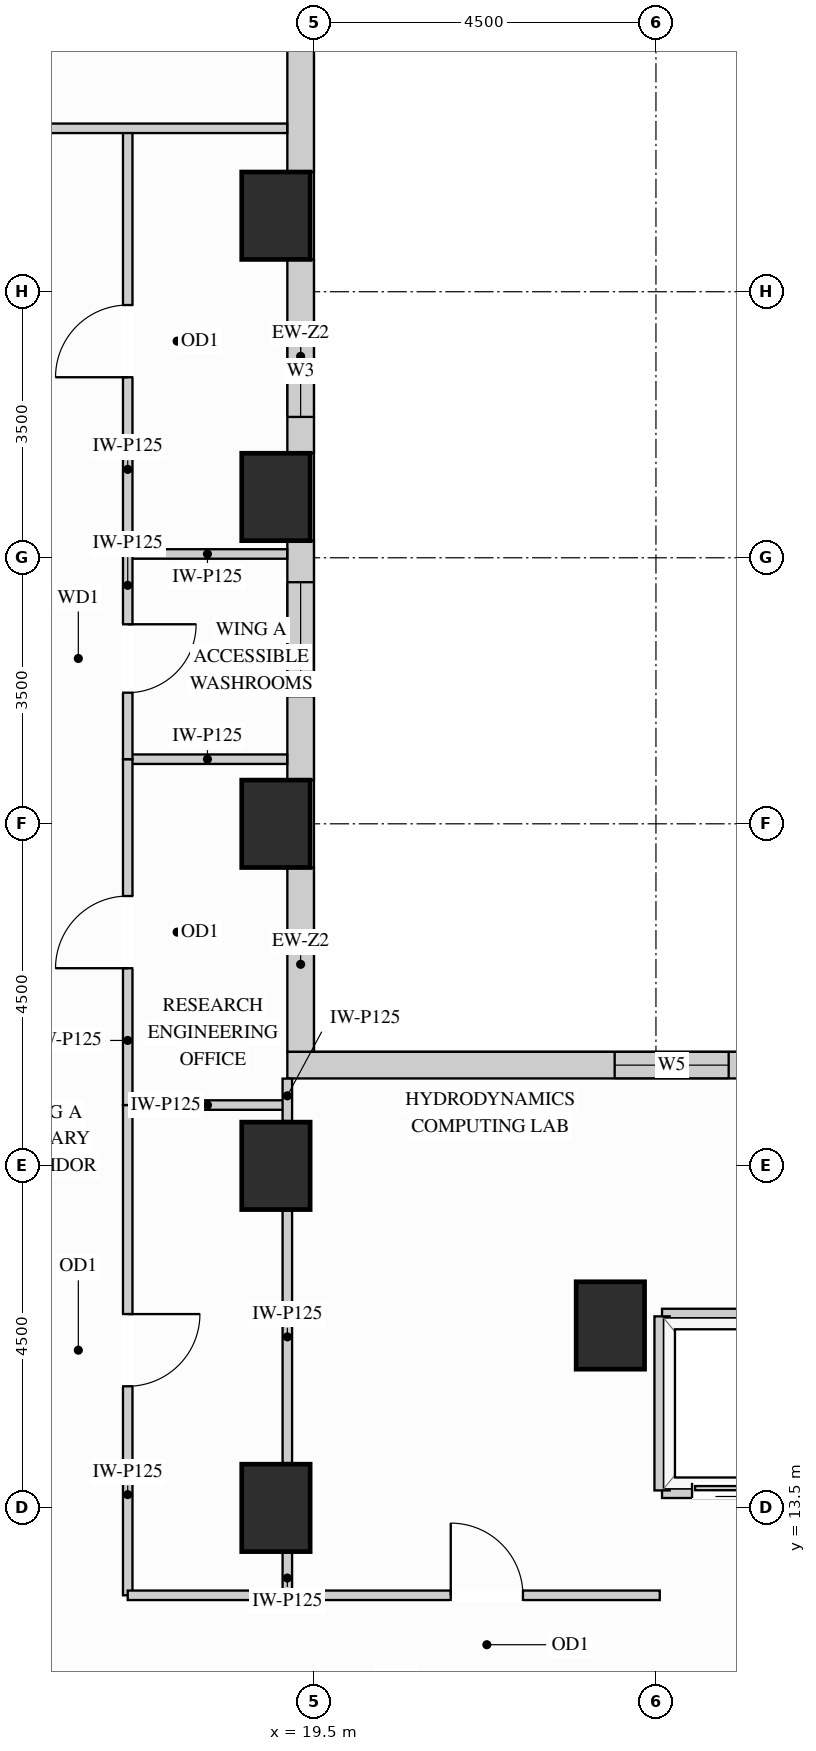
"""IFC4 building model, lengths in metres.
Left out: names, types, materials, properties, quantities, classifications, styles, units other than length and angle.
Written with IfcOpenShell. Run it as: python <this file> out.ifc"""

import sys

from ifc_helpers import new_model, si_unit, direction, frame, frame_2d, origin, origin_2d, place, context, subcontext, project, spatial, rectangle, extrude, source, transform, mapped, element, fill, save


model = new_model("IFC4")
c1 = context("Model", 3, precision=1e-05, world=origin(), true_north=direction((0.0, 1.0)))
c2 = subcontext(c1, "Body", "Model", "MODEL_VIEW")
j1 = project(units=[si_unit("LENGTHUNIT", "METRE"), si_unit("PLANEANGLEUNIT", "RADIAN")], contexts=[c1])
p1 = place(None, origin())
s1 = spatial("IfcSite", under=j1, at=p1, CompositionType="ELEMENT")
p2 = place(p1, origin())
s2 = spatial("IfcBuilding", under=s1, at=p2, CompositionType="ELEMENT")
p3 = place(p2, frame((0.0, 0.0, 120.6)))
s3 = spatial("IfcBuildingStorey", under=s2, at=p3, CompositionType="ELEMENT", Elevation=120.6)
m1 = source(origin(), c2, "Body", "SweptSolid", [
    extrude(rectangle(XDim=0.9, YDim=1.15, at=origin_2d()), origin(), (0.0, 0.0, 1.0), 3.38),
])
for number, where, z_axis, x_axis in (
    (1, (19.0, 13.5, 0.0), (0.0, 0.0, 1.0), (1.0, 0.0, 0.0)),
    (2, (19.0, 18.0, 0.0), (0.0, 0.0, 1.0), (1.0, 0.0, 0.0)),
    (3, (19.0, 22.5, 0.0), (0.0, 0.0, 1.0), (1.0, 0.0, 0.0)),
    (4, (19.0, 26.8, 0.0), (0.0, 0.0, 1.0), (1.0, 0.0, 0.0)),
    (5, (19.0, 30.5, 0.0), (0.0, 0.0, 1.0), (1.0, 0.0, 0.0)),
    (6, (23.4, 15.9, 0.0), (0.0, 0.0, 1.0), (1.0, 0.0, 0.0)),
):
    element("IfcColumn", number, at=place(p3, frame(where, z_axis=z_axis, x_axis=x_axis)), inside=s3, PredefinedType="COLUMN", context=c2, shape_type="MappedRepresentation", body=[
        mapped(m1, transform((0.0, 0.0, 0.0), x_axis=(1.0, 0.0, 0.0), y_axis=(0.0, 1.0, 0.0), z_axis=(0.0, 0.0, 1.0))),
    ])
m2 = source(origin(), c2, "Body", "SweptSolid", [
    extrude(rectangle(XDim=2.429, YDim=0.35, at=frame_2d((1.214, 0.0))), origin(), (0.0, 0.0, 1.0), 2.519),
])
p4 = place(p3, frame((19.325, 19.498, 0.0), z_axis=(0.0, 0.0, 1.0), x_axis=(0.0, 1.0, 0.0)))
e7 = element("IfcWall", 7, at=p4, inside=s3, PredefinedType="SOLIDWALL", context=c2, shape_type="MappedRepresentation", body=[
    mapped(m2, transform((0.0, 0.0, 0.0), x_axis=(1.0, 0.0, 0.0), y_axis=(0.0, 1.0, 0.0), z_axis=(0.0, 0.0, 1.0))),
])
p5 = place(p3, frame((19.325, 23.073, 0.0), z_axis=(0.0, 0.0, 1.0), x_axis=(0.0, 1.0, 0.0)))
e8 = element("IfcWall", 8, at=p5, inside=s3, PredefinedType="SOLIDWALL", context=c2, shape_type="SweptSolid", body=[
    extrude(rectangle(XDim=3.154, YDim=0.35, at=frame_2d((1.577, 0.0))), origin(), (0.0, 0.0, 1.0), 2.519),
])
p6 = place(p5, frame((1.105, 0.0, 0.78)))
e9 = element("IfcOpeningElement", 9, at=p6, cuts=e8, PredefinedType="OPENING", context=c2, shape_type="SweptSolid", body=[
    extrude(rectangle(XDim=1.5, YDim=1.559, at=frame_2d((0.75, 0.78))), frame((0.0, 0.185, 0.0), z_axis=(0.0, -1.0, 0.0), x_axis=(1.0, 0.0, 0.0)), (0.0, 0.0, 1.0), 0.37),
])
p7 = place(p3, frame((19.325, 27.373, 0.0), z_axis=(0.0, 0.0, 1.0), x_axis=(0.0, 1.0, 0.0)))
e10 = element("IfcWall", 10, at=p7, inside=s3, PredefinedType="SOLIDWALL", context=c2, shape_type="SweptSolid", body=[
    extrude(rectangle(XDim=2.554, YDim=0.35, at=frame_2d((1.277, 0.0))), origin(), (0.0, 0.0, 1.0), 2.519),
])
p8 = place(p7, frame((0.48, 0.0, 0.78)))
e11 = element("IfcOpeningElement", 11, at=p8, cuts=e10, PredefinedType="OPENING", context=c2, shape_type="SweptSolid", body=[
    extrude(rectangle(XDim=1.2, YDim=1.559, at=frame_2d((0.6, 0.78))), frame((0.0, 0.185, 0.0), z_axis=(0.0, -1.0, 0.0), x_axis=(1.0, 0.0, 0.0)), (0.0, 0.0, 1.0), 0.37),
])
m3 = source(origin(), c2, "Body", "SweptSolid", [
    extrude(rectangle(XDim=3.354, YDim=0.35, at=frame_2d((1.677, 0.0))), origin(), (0.0, 0.0, 1.0), 2.519),
])
p9 = place(p3, frame((19.325, 31.073, 0.0), z_axis=(0.0, 0.0, 1.0), x_axis=(0.0, 1.0, 0.0)))
e12 = element("IfcWall", 12, at=p9, inside=s3, PredefinedType="SOLIDWALL", context=c2, shape_type="MappedRepresentation", body=[
    mapped(m3, transform((0.0, 0.0, 0.0), x_axis=(1.0, 0.0, 0.0), y_axis=(0.0, 1.0, 0.0), z_axis=(0.0, 0.0, 1.0))),
])
p10 = place(p3, frame((34.75, 19.325, 0.0), z_axis=(0.0, 0.0, 1.0), x_axis=(-1.0, 0.0, 0.0)))
e13 = element("IfcWall", 13, at=p10, inside=s3, PredefinedType="SOLIDWALL", context=c2, shape_type="SweptSolid", body=[
    extrude(rectangle(XDim=15.6, YDim=0.35, at=frame_2d((7.8, 0.0))), origin(), (0.0, 0.0, 1.0), 3.365),
])
p11 = place(p10, frame((4.307, 0.0, 0.78)))
e14 = element("IfcOpeningElement", 14, at=p11, cuts=e13, PredefinedType="OPENING", context=c2, shape_type="SweptSolid", body=[
    extrude(rectangle(XDim=1.5, YDim=2.0, at=frame_2d((0.75, 1.0))), frame((0.0, 0.185, 0.0), z_axis=(0.0, -1.0, 0.0), x_axis=(1.0, 0.0, 0.0)), (0.0, 0.0, 1.0), 0.37),
])
p12 = place(p10, frame((9.793, 0.0, 0.78)))
e15 = element("IfcOpeningElement", 15, at=p12, cuts=e13, PredefinedType="OPENING", context=c2, shape_type="SweptSolid", body=[
    extrude(rectangle(XDim=1.5, YDim=2.0, at=frame_2d((0.75, 1.0))), frame((0.0, 0.185, 0.0), z_axis=(0.0, -1.0, 0.0), x_axis=(1.0, 0.0, 0.0)), (0.0, 0.0, 1.0), 0.37),
])
m4 = source(origin(), c2, "Body", "SweptSolid", [
    extrude(rectangle(XDim=2.1, YDim=0.125, at=frame_2d((1.05, 0.0))), origin(), (0.0, 0.0, 1.0), 3.365),
])
p13 = place(p3, frame((17.05, 18.8, 0.0), z_axis=(0.0, 0.0, 1.0), x_axis=(1.0, 0.0, 0.0)))
e16 = element("IfcWall", 16, at=p13, inside=s3, PredefinedType="PARTITIONING", context=c2, shape_type="MappedRepresentation", body=[
    mapped(m4, transform((0.0, 0.0, 0.0), x_axis=(1.0, 0.0, 0.0), y_axis=(0.0, 1.0, 0.0), z_axis=(0.0, 0.0, 1.0))),
])
m5 = source(origin(), c2, "Body", "SweptSolid", [
    extrude(rectangle(XDim=2.098, YDim=0.125, at=frame_2d((1.049, 0.0))), origin(), (0.0, 0.0, 1.0), 3.365),
])
for number, where, z_axis, x_axis in (
    (17, (17.05, 23.35, 0.0), (0.0, 0.0, 1.0), (1.0, 0.0, 0.0)),
    (18, (17.05, 26.05, 0.0), (0.0, 0.0, 1.0), (1.0, 0.0, 0.0)),
):
    element("IfcWall", number, at=place(p3, frame(where, z_axis=z_axis, x_axis=x_axis)), inside=s3, PredefinedType="PARTITIONING", context=c2, shape_type="MappedRepresentation", body=[
        mapped(m5, transform((0.0, 0.0, 0.0), x_axis=(1.0, 0.0, 0.0), y_axis=(0.0, 1.0, 0.0), z_axis=(0.0, 0.0, 1.0))),
    ])
m6 = source(origin(), c2, "Body", "SweptSolid", [
    extrude(rectangle(XDim=0.56, YDim=0.125, at=frame_2d((0.28, 0.0))), origin(), (0.0, 0.0, 1.0), 2.677),
])
p14 = place(p3, frame((19.15, 12.35, 0.0), z_axis=(0.0, 0.0, 1.0), x_axis=(0.0, 1.0, 0.0)))
e19 = element("IfcWall", 19, at=p14, inside=s3, PredefinedType="PARTITIONING", context=c2, shape_type="MappedRepresentation", body=[
    mapped(m6, transform((0.0, 0.0, 0.0), x_axis=(1.0, 0.0, 0.0), y_axis=(0.0, 1.0, 0.0), z_axis=(0.0, 0.0, 1.0))),
])
m7 = source(origin(), c2, "Body", "SweptSolid", [
    extrude(rectangle(XDim=3.32, YDim=0.125, at=frame_2d((1.66, 0.0))), origin(), (0.0, 0.0, 1.0), 2.677),
])
p15 = place(p3, frame((19.15, 14.09, 0.0), z_axis=(0.0, 0.0, 1.0), x_axis=(0.0, 1.0, 0.0)))
e20 = element("IfcWall", 20, at=p15, inside=s3, PredefinedType="PARTITIONING", context=c2, shape_type="MappedRepresentation", body=[
    mapped(m7, transform((0.0, 0.0, 0.0), x_axis=(1.0, 0.0, 0.0), y_axis=(0.0, 1.0, 0.0), z_axis=(0.0, 0.0, 1.0))),
])
m8 = source(origin(), c2, "Body", "SweptSolid", [
    extrude(rectangle(XDim=0.558, YDim=0.125, at=frame_2d((0.279, 0.0))), origin(), (0.0, 0.0, 1.0), 2.519),
])
p16 = place(p3, frame((19.15, 18.59, 0.0), z_axis=(0.0, 0.0, 1.0), x_axis=(0.0, 1.0, 0.0)))
e21 = element("IfcWall", 21, at=p16, inside=s3, PredefinedType="PARTITIONING", context=c2, shape_type="MappedRepresentation", body=[
    mapped(m8, transform((0.0, 0.0, 0.0), x_axis=(1.0, 0.0, 0.0), y_axis=(0.0, 1.0, 0.0), z_axis=(0.0, 0.0, 1.0))),
])
p17 = place(p3, frame((17.05, 12.35, 0.0), z_axis=(0.0, 0.0, 1.0), x_axis=(0.0, 1.0, 0.0)))
e22 = element("IfcWall", 22, at=p17, inside=s3, PredefinedType="PARTITIONING", context=c2, shape_type="SweptSolid", body=[
    extrude(rectangle(XDim=6.45, YDim=0.125, at=frame_2d((3.225, 0.0))), origin(), (0.0, 0.0, 1.0), 3.365),
])
p18 = place(p17, frame((2.75, 0.0, 0.0)))
e23 = element("IfcOpeningElement", 23, at=p18, cuts=e22, PredefinedType="OPENING", context=c2, shape_type="SweptSolid", body=[
    extrude(rectangle(XDim=0.95, YDim=2.15, at=frame_2d((0.475, 1.075))), frame((0.0, 0.073, 0.0), z_axis=(0.0, -1.0, 0.0), x_axis=(1.0, 0.0, 0.0)), (0.0, 0.0, 1.0), 0.145),
])
p19 = place(p3, frame((17.05, 18.8, 0.0), z_axis=(0.0, 0.0, 1.0), x_axis=(0.0, 1.0, 0.0)))
e24 = element("IfcWall", 24, at=p19, inside=s3, PredefinedType="PARTITIONING", context=c2, shape_type="SweptSolid", body=[
    extrude(rectangle(XDim=4.55, YDim=0.125, at=frame_2d((2.275, 0.0))), origin(), (0.0, 0.0, 1.0), 3.365),
])
p20 = place(p19, frame((1.8, 0.0, 0.0)))
e25 = element("IfcOpeningElement", 25, at=p20, cuts=e24, PredefinedType="OPENING", context=c2, shape_type="SweptSolid", body=[
    extrude(rectangle(XDim=0.95, YDim=2.15, at=frame_2d((0.475, 1.075))), frame((0.0, 0.073, 0.0), z_axis=(0.0, -1.0, 0.0), x_axis=(1.0, 0.0, 0.0)), (0.0, 0.0, 1.0), 0.145),
])
p21 = place(p3, frame((17.05, 26.05, 0.0), z_axis=(0.0, 0.0, 1.0), x_axis=(0.0, 1.0, 0.0)))
e26 = element("IfcWall", 26, at=p21, inside=s3, PredefinedType="PARTITIONING", context=c2, shape_type="SweptSolid", body=[
    extrude(rectangle(XDim=5.6, YDim=0.125, at=frame_2d((2.8, 0.0))), origin(), (0.0, 0.0, 1.0), 3.365),
])
p22 = place(p21, frame((2.325, 0.0, 0.0)))
e27 = element("IfcOpeningElement", 27, at=p22, cuts=e26, PredefinedType="OPENING", context=c2, shape_type="SweptSolid", body=[
    extrude(rectangle(XDim=0.95, YDim=2.15, at=frame_2d((0.475, 1.075))), frame((0.0, 0.073, 0.0), z_axis=(0.0, -1.0, 0.0), x_axis=(1.0, 0.0, 0.0)), (0.0, 0.0, 1.0), 0.145),
])
p23 = place(p3, frame((17.05, 23.35, 0.0), z_axis=(0.0, 0.0, 1.0), x_axis=(0.0, 1.0, 0.0)))
e28 = element("IfcWall", 28, at=p23, inside=s3, PredefinedType="PARTITIONING", context=c2, shape_type="SweptSolid", body=[
    extrude(rectangle(XDim=2.7, YDim=0.125, at=frame_2d((1.35, 0.0))), origin(), (0.0, 0.0, 1.0), 3.365),
])
p24 = place(p23, frame((0.875, 0.0, 0.0)))
e29 = element("IfcOpeningElement", 29, at=p24, cuts=e28, PredefinedType="OPENING", context=c2, shape_type="SweptSolid", body=[
    extrude(rectangle(XDim=0.9, YDim=2.15, at=frame_2d((0.45, 1.075))), frame((0.0, 0.073, 0.0), z_axis=(0.0, -1.0, 0.0), x_axis=(1.0, 0.0, 0.0)), (0.0, 0.0, 1.0), 0.145),
])
m9 = source(origin(), c2, "Body", "SweptSolid", [
    extrude(rectangle(XDim=12.598, YDim=0.125, at=frame_2d((6.299, 0.0))), origin(), (0.0, 0.0, 1.0), 2.828),
])
p25 = place(p3, frame((6.55, 31.65, 0.0), z_axis=(0.0, 0.0, 1.0), x_axis=(1.0, 0.0, 0.0)))
e30 = element("IfcWall", 30, at=p25, inside=s3, PredefinedType="PARTITIONING", context=c2, shape_type="MappedRepresentation", body=[
    mapped(m9, transform((0.0, 0.0, 0.0), x_axis=(1.0, 0.0, 0.0), y_axis=(0.0, 1.0, 0.0), z_axis=(0.0, 0.0, 1.0))),
])
m10 = source(origin(), c2, "Body", "SweptSolid", [
    extrude(rectangle(XDim=2.45, YDim=0.125, at=frame_2d((1.225, 0.0))), origin(), (0.0, 0.0, 1.0), 3.365),
])
p26 = place(p3, frame((17.05, 12.35, 0.0), z_axis=(0.0, 0.0, 1.0), x_axis=(1.0, 0.0, 0.0)))
e31 = element("IfcWall", 31, at=p26, inside=s3, PredefinedType="PARTITIONING", context=c2, shape_type="MappedRepresentation", body=[
    mapped(m10, transform((0.0, 0.0, 0.0), x_axis=(1.0, 0.0, 0.0), y_axis=(0.0, 1.0, 0.0), z_axis=(0.0, 0.0, 1.0))),
])
p27 = place(p3, frame((19.5, 12.35, 0.0), z_axis=(0.0, 0.0, 1.0), x_axis=(1.0, 0.0, 0.0)))
e32 = element("IfcWall", 32, at=p27, inside=s3, PredefinedType="PARTITIONING", context=c2, shape_type="SweptSolid", body=[
    extrude(rectangle(XDim=4.55, YDim=0.125, at=frame_2d((2.275, 0.0))), origin(), (0.0, 0.0, 1.0), 3.365),
])
p28 = place(p27, frame((1.8, 0.0, 0.0)))
e33 = element("IfcOpeningElement", 33, at=p28, cuts=e32, PredefinedType="OPENING", context=c2, shape_type="SweptSolid", body=[
    extrude(rectangle(XDim=0.95, YDim=2.15, at=frame_2d((0.475, 1.075))), frame((0.0, 0.073, 0.0), z_axis=(0.0, -1.0, 0.0), x_axis=(1.0, 0.0, 0.0)), (0.0, 0.0, 1.0), 0.145),
])
m11 = source(origin(), c2, "Body", "SweptSolid", [
    extrude(rectangle(XDim=1.89, YDim=0.2, at=frame_2d((0.945, 0.0))), origin(), (0.0, 0.0, 1.0), 2.677),
])
p29 = place(p3, frame((24.08, 16.02, 0.0), z_axis=(0.0, 0.0, 1.0), x_axis=(1.0, 0.0, 0.0)))
e34 = element("IfcWall", 34, at=p29, inside=s3, PredefinedType="PARTITIONING", context=c2, shape_type="MappedRepresentation", body=[
    mapped(m11, transform((0.0, 0.0, 0.0), x_axis=(1.0, 0.0, 0.0), y_axis=(0.0, 1.0, 0.0), z_axis=(0.0, 0.0, 1.0))),
])
p30 = place(p3, frame((24.08, 13.73, 0.0), z_axis=(0.0, 0.0, 1.0), x_axis=(1.0, 0.0, 0.0)))
e35 = element("IfcWall", 35, at=p30, inside=s3, PredefinedType="PARTITIONING", context=c2, shape_type="SweptSolid", body=[
    extrude(rectangle(XDim=1.89, YDim=0.2, at=frame_2d((0.945, 0.0))), origin(), (0.0, 0.0, 1.0), 2.446),
])
p31 = place(p30, frame((0.395, 0.0, 0.0)))
e36 = element("IfcOpeningElement", 36, at=p31, cuts=e35, PredefinedType="OPENING", context=c2, shape_type="SweptSolid", body=[
    extrude(rectangle(XDim=1.1, YDim=2.2, at=frame_2d((0.55, 1.1))), frame((0.0, 0.11, 0.0), z_axis=(0.0, -1.0, 0.0), x_axis=(1.0, 0.0, 0.0)), (0.0, 0.0, 1.0), 0.22),
])
m12 = source(origin(), c2, "Body", "SweptSolid", [
    extrude(rectangle(XDim=2.29, YDim=0.2, at=frame_2d((1.145, 0.0))), origin(), (0.0, 0.0, 1.0), 3.365),
])
p32 = place(p3, frame((24.08, 13.73, 0.0), z_axis=(0.0, 0.0, 1.0), x_axis=(0.0, 1.0, 0.0)))
e37 = element("IfcWall", 37, at=p32, inside=s3, PredefinedType="PARTITIONING", context=c2, shape_type="MappedRepresentation", body=[
    mapped(m12, transform((0.0, 0.0, 0.0), x_axis=(1.0, 0.0, 0.0), y_axis=(0.0, 1.0, 0.0), z_axis=(0.0, 0.0, 1.0))),
])
m13 = source(origin(), c2, "Body", "SweptSolid", [
    extrude(rectangle(XDim=1.1, YDim=2.2, at=frame_2d((0.55, 1.1))), frame((0.0, 0.025, 0.0), z_axis=(0.0, -1.0, 0.0), x_axis=(1.0, 0.0, 0.0)), (0.0, 0.0, 1.0), 0.05),
])
p33 = place(p31, origin())
e38 = element("IfcDoor", 38, at=p33, inside=s3, OperationType="SLIDING_TO_LEFT", PredefinedType="DOOR", context=c2, shape_type="MappedRepresentation", body=[
    mapped(m13, transform((0.0, 0.0, 0.0), x_axis=(1.0, 0.0, 0.0), y_axis=(0.0, 1.0, 0.0), z_axis=(0.0, 0.0, 1.0))),
])
fill(e36, e38)
m14 = source(origin(), c2, "Body", "SweptSolid", [
    extrude(rectangle(XDim=0.95, YDim=2.15, at=frame_2d((0.475, 1.075))), frame((0.0, 0.025, 0.0), z_axis=(0.0, -1.0, 0.0), x_axis=(1.0, 0.0, 0.0)), (0.0, 0.0, 1.0), 0.05),
])
p34 = place(p18, origin())
e39 = element("IfcDoor", 39, at=p34, inside=s3, OperationType="SINGLE_SWING_RIGHT", PredefinedType="DOOR", context=c2, shape_type="MappedRepresentation", body=[
    mapped(m14, transform((0.0, 0.0, 0.0), x_axis=(1.0, 0.0, 0.0), y_axis=(0.0, 1.0, 0.0), z_axis=(0.0, 0.0, 1.0))),
])
fill(e23, e39)
p35 = place(p20, origin())
e40 = element("IfcDoor", 40, at=p35, inside=s3, OperationType="SINGLE_SWING_LEFT", PredefinedType="DOOR", context=c2, shape_type="MappedRepresentation", body=[
    mapped(m14, transform((0.0, 0.0, 0.0), x_axis=(1.0, 0.0, 0.0), y_axis=(0.0, 1.0, 0.0), z_axis=(0.0, 0.0, 1.0))),
])
fill(e25, e40)
p36 = place(p22, origin())
e41 = element("IfcDoor", 41, at=p36, inside=s3, OperationType="SINGLE_SWING_LEFT", PredefinedType="DOOR", context=c2, shape_type="MappedRepresentation", body=[
    mapped(m14, transform((0.0, 0.0, 0.0), x_axis=(1.0, 0.0, 0.0), y_axis=(0.0, 1.0, 0.0), z_axis=(0.0, 0.0, 1.0))),
])
fill(e27, e41)
p37 = place(p28, origin())
e42 = element("IfcDoor", 42, at=p37, inside=s3, OperationType="SINGLE_SWING_LEFT", PredefinedType="DOOR", context=c2, shape_type="MappedRepresentation", body=[
    mapped(m14, transform((0.0, 0.0, 0.0), x_axis=(1.0, 0.0, 0.0), y_axis=(0.0, 1.0, 0.0), z_axis=(0.0, 0.0, 1.0))),
])
fill(e33, e42)
m15 = source(origin(), c2, "Body", "SweptSolid", [
    extrude(rectangle(XDim=0.9, YDim=2.15, at=frame_2d((0.45, 1.075))), frame((0.0, 0.025, 0.0), z_axis=(0.0, -1.0, 0.0), x_axis=(1.0, 0.0, 0.0)), (0.0, 0.0, 1.0), 0.05),
])
p38 = place(p24, origin())
e43 = element("IfcDoor", 43, at=p38, inside=s3, OperationType="SINGLE_SWING_RIGHT", PredefinedType="DOOR", context=c2, shape_type="MappedRepresentation", body=[
    mapped(m15, transform((0.0, 0.0, 0.0), x_axis=(1.0, 0.0, 0.0), y_axis=(0.0, 1.0, 0.0), z_axis=(0.0, 0.0, 1.0))),
])
fill(e29, e43)
m16 = source(origin(), c2, "Body", "SweptSolid", [
    extrude(rectangle(XDim=1.2, YDim=1.559, at=frame_2d((0.6, 0.78))), frame((0.0, 0.03, 0.0), z_axis=(0.0, -1.0, 0.0), x_axis=(1.0, 0.0, 0.0)), (0.0, 0.0, 1.0), 0.06),
])
p39 = place(p8, origin())
e44 = element("IfcWindow", 44, at=p39, inside=s3, PartitioningType="SINGLE_PANEL", PredefinedType="WINDOW", context=c2, shape_type="MappedRepresentation", body=[
    mapped(m16, transform((0.0, 0.0, 0.0), x_axis=(1.0, 0.0, 0.0), y_axis=(0.0, 1.0, 0.0), z_axis=(0.0, 0.0, 1.0))),
])
fill(e11, e44)
m17 = source(origin(), c2, "Body", "SweptSolid", [
    extrude(rectangle(XDim=1.5, YDim=1.559, at=frame_2d((0.75, 0.78))), frame((0.0, 0.03, 0.0), z_axis=(0.0, -1.0, 0.0), x_axis=(1.0, 0.0, 0.0)), (0.0, 0.0, 1.0), 0.06),
])
p40 = place(p6, origin())
e45 = element("IfcWindow", 45, at=p40, inside=s3, PartitioningType="SINGLE_PANEL", PredefinedType="WINDOW", context=c2, shape_type="MappedRepresentation", body=[
    mapped(m17, transform((0.0, 0.0, 0.0), x_axis=(1.0, 0.0, 0.0), y_axis=(0.0, 1.0, 0.0), z_axis=(0.0, 0.0, 1.0))),
])
fill(e9, e45)
m18 = source(origin(), c2, "Body", "SweptSolid", [
    extrude(rectangle(XDim=1.5, YDim=2.0, at=frame_2d((0.75, 1.0))), frame((0.0, 0.03, 0.0), z_axis=(0.0, -1.0, 0.0), x_axis=(1.0, 0.0, 0.0)), (0.0, 0.0, 1.0), 0.06),
])
p41 = place(p12, origin())
e46 = element("IfcWindow", 46, at=p41, inside=s3, PartitioningType="SINGLE_PANEL", PredefinedType="WINDOW", context=c2, shape_type="MappedRepresentation", body=[
    mapped(m18, transform((0.0, 0.0, 0.0), x_axis=(1.0, 0.0, 0.0), y_axis=(0.0, 1.0, 0.0), z_axis=(0.0, 0.0, 1.0))),
])
fill(e15, e46)
save(model, sys.argv[1])
